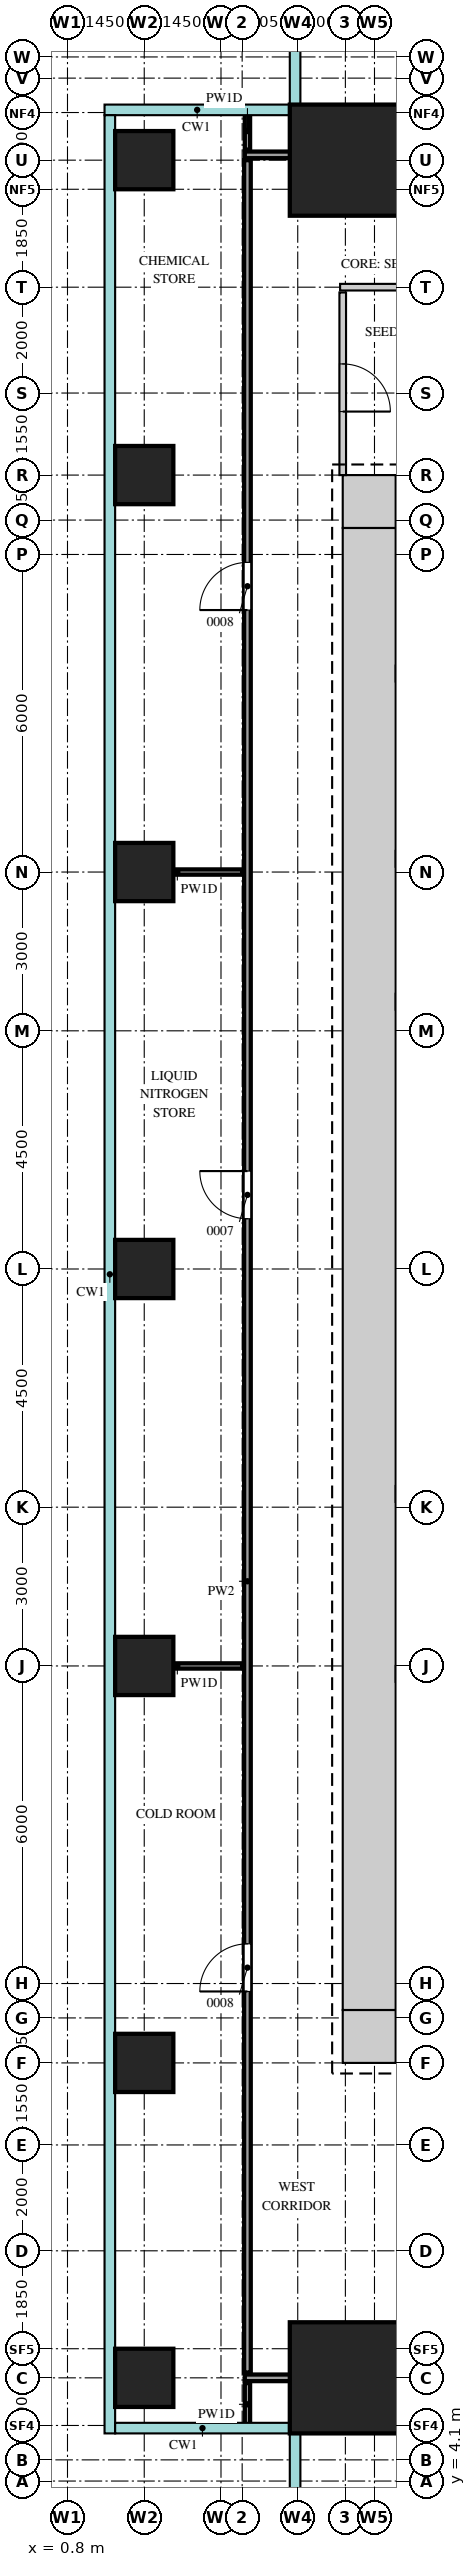
"""IFC4 building model, lengths in metres.
Left out: names, types, materials, properties, quantities, classifications, styles, units other than length and angle.
Written with IfcOpenShell. Run it as: python <this file> out.ifc"""

import sys

from ifc_helpers import new_model, si_unit, direction, frame, frame_2d, origin, origin_2d, place, context, subcontext, project, spatial, rectangle, extrude, source, transform, mapped, element, fill, save


model = new_model("IFC4")
c1 = context("Model", 3, precision=1e-05, world=origin(), true_north=direction((0.0, 1.0)))
c2 = subcontext(c1, "Body", "Model", "MODEL_VIEW")
j1 = project(units=[si_unit("LENGTHUNIT", "METRE"), si_unit("PLANEANGLEUNIT", "RADIAN")], contexts=[c1])
p1 = place(None, origin())
s1 = spatial("IfcSite", under=j1, at=p1, CompositionType="ELEMENT")
p2 = place(p1, origin())
s2 = spatial("IfcBuilding", under=s1, at=p2, CompositionType="ELEMENT")
p3 = place(p2, frame((0.0, 0.0, 105.9)))
s3 = spatial("IfcBuildingStorey", under=s2, at=p3, CompositionType="ELEMENT", Elevation=105.9)
m1 = source(origin(), c2, "Body", "SweptSolid", [
    extrude(rectangle(XDim=1.0, YDim=1.0, at=frame_2d((0.5, 0.0))), origin(), (0.0, 0.0, 1.0), 4.1),
])
for number, where, z_axis, x_axis in (
    (1, (6.0, 41.5, 0.0), (0.0, 0.0, 1.0), (1.0, 0.0, 0.0)),
    (2, (6.0, 12.5, 0.0), (0.0, 0.0, 1.0), (1.0, 0.0, 0.0)),
):
    element("IfcWall", number, at=place(p3, frame(where, z_axis=z_axis, x_axis=x_axis)), inside=s3, PredefinedType="SHEAR", context=c2, shape_type="MappedRepresentation", body=[
        mapped(m1, transform((0.0, 0.0, 0.0))),
    ])
m2 = source(origin(), c2, "Body", "SweptSolid", [
    extrude(rectangle(XDim=28.0, YDim=1.0, at=frame_2d((14.0, 0.0))), origin(), (0.0, 0.0, 1.0), 4.1),
])
p4 = place(p3, frame((6.5, 13.0, 0.0), z_axis=(0.0, 0.0, 1.0), x_axis=(0.0, 1.0, 0.0)))
e3 = element("IfcWall", 3, at=p4, inside=s3, PredefinedType="SHEAR", context=c2, shape_type="MappedRepresentation", body=[
    mapped(m2, transform((0.0, 0.0, 0.0))),
])
m3 = source(origin(), c2, "Body", "SweptSolid", [
    extrude(rectangle(XDim=2.1, YDim=2.1, at=origin_2d()), origin(), (0.0, 0.0, 1.0), 4.4),
])
for number, where, z_axis, x_axis in (
    (4, (6.05, 47.95, 0.0), (0.0, 0.0, 1.0), (1.0, 0.0, 0.0)),
    (5, (6.05, 6.05, 0.0), (0.0, 0.0, 1.0), (1.0, 0.0, 0.0)),
):
    element("IfcColumn", number, at=place(p3, frame(where, z_axis=z_axis, x_axis=x_axis)), inside=s3, PredefinedType="COLUMN", context=c2, shape_type="MappedRepresentation", body=[
        mapped(m3, transform((0.0, 0.0, 0.0))),
    ])
m4 = source(origin(), c2, "Body", "SweptSolid", [
    extrude(rectangle(XDim=1.1, YDim=1.1, at=origin_2d()), origin(), (0.0, 0.0, 1.0), 4.1),
])
for number, where, z_axis, x_axis in (
    (6, (2.25, 6.05, 0.0), (0.0, 0.0, 1.0), (1.0, 0.0, 0.0)),
    (7, (2.25, 12.0, 0.0), (0.0, 0.0, 1.0), (1.0, 0.0, 0.0)),
    (8, (2.25, 19.5, 0.0), (0.0, 0.0, 1.0), (1.0, 0.0, 0.0)),
    (9, (2.25, 27.0, 0.0), (0.0, 0.0, 1.0), (1.0, 0.0, 0.0)),
    (10, (2.25, 34.5, 0.0), (0.0, 0.0, 1.0), (1.0, 0.0, 0.0)),
    (11, (2.25, 42.0, 0.0), (0.0, 0.0, 1.0), (1.0, 0.0, 0.0)),
    (12, (2.25, 47.95, 0.0), (0.0, 0.0, 1.0), (1.0, 0.0, 0.0)),
):
    element("IfcColumn", number, at=place(p3, frame(where, z_axis=z_axis, x_axis=x_axis)), inside=s3, PredefinedType="COLUMN", context=c2, shape_type="MappedRepresentation", body=[
        mapped(m4, transform((0.0, 0.0, 0.0))),
    ])
m5 = source(origin(), c2, "Body", "SweptSolid", [
    extrude(rectangle(XDim=0.8, YDim=0.1, at=frame_2d((0.4, 0.0))), origin(), (0.0, 0.0, 1.0), 4.2),
])
p5 = place(p3, frame((4.2, 5.15, 0.0), z_axis=(0.0, 0.0, 1.0), x_axis=(0.0, 1.0, 0.0)))
e13 = element("IfcWall", 13, at=p5, inside=s3, PredefinedType="PARTITIONING", context=c2, shape_type="MappedRepresentation", body=[
    mapped(m5, transform((0.0, 0.0, 0.0))),
])
m6 = source(origin(), c2, "Body", "SweptSolid", [
    extrude(rectangle(XDim=22.3, YDim=0.125, at=frame_2d((11.15, 0.0))), origin(), (0.0, 0.0, 1.0), 3.55),
])
p6 = place(p3, frame((4.15, 6.05, 0.0), z_axis=(0.0, 0.0, 1.0), x_axis=(1.0, 0.0, 0.0)))
e14 = element("IfcWall", 14, at=p6, inside=s3, PredefinedType="PARTITIONING", context=c2, shape_type="MappedRepresentation", body=[
    mapped(m6, transform((0.0, 0.0, 0.0))),
])
m7 = source(origin(), c2, "Body", "SweptSolid", [
    extrude(rectangle(XDim=0.9, YDim=2.1, at=frame_2d((0.45, 1.05))), frame((0.0, 0.073, 0.0), z_axis=(0.0, -1.0, 0.0), x_axis=(1.0, 0.0, 0.0)), (0.0, 0.0, 1.0), 0.145),
])
p7 = place(p6, frame((3.5, 0.0, 0.0)))
e15 = element("IfcOpeningElement", 15, at=p7, cuts=e14, PredefinedType="OPENING", context=c2, shape_type="MappedRepresentation", body=[
    mapped(m7, transform((0.0, 0.0, 0.0))),
])
p8 = place(p6, frame((11.0, 0.0, 0.0)))
e16 = element("IfcOpeningElement", 16, at=p8, cuts=e14, PredefinedType="OPENING", context=c2, shape_type="MappedRepresentation", body=[
    mapped(m7, transform((0.0, 0.0, 0.0))),
])
p9 = place(p6, frame((18.35, 0.0, 0.0)))
e17 = element("IfcOpeningElement", 17, at=p9, cuts=e14, PredefinedType="OPENING", context=c2, shape_type="MappedRepresentation", body=[
    mapped(m7, transform((0.0, 0.0, 0.0))),
])
m8 = source(origin(), c2, "Body", "SweptSolid", [
    extrude(rectangle(XDim=41.8, YDim=0.125, at=frame_2d((20.9, 0.0))), origin(), (0.0, 0.0, 1.0), 4.2),
])
p10 = place(p3, frame((4.2, 6.15, 0.0), z_axis=(0.0, 0.0, 1.0), x_axis=(0.0, 1.0, 0.0)))
e18 = element("IfcWall", 18, at=p10, inside=s3, PredefinedType="PARTITIONING", context=c2, shape_type="MappedRepresentation", body=[
    mapped(m8, transform((0.0, 0.0, 0.0))),
])
p11 = place(p10, frame((7.2, 0.0, 0.0)))
e19 = element("IfcOpeningElement", 19, at=p11, cuts=e18, PredefinedType="OPENING", context=c2, shape_type="MappedRepresentation", body=[
    mapped(m7, transform((0.0, 0.0, 0.0))),
])
p12 = place(p10, frame((21.8, 0.0, 0.0)))
e20 = element("IfcOpeningElement", 20, at=p12, cuts=e18, PredefinedType="OPENING", context=c2, shape_type="MappedRepresentation", body=[
    mapped(m7, transform((0.0, 0.0, 0.0))),
])
p13 = place(p10, frame((33.3, 0.0, 0.0)))
e21 = element("IfcOpeningElement", 21, at=p13, cuts=e18, PredefinedType="OPENING", context=c2, shape_type="MappedRepresentation", body=[
    mapped(m7, transform((0.0, 0.0, 0.0))),
])
m9 = source(origin(), c2, "Body", "SweptSolid", [
    extrude(rectangle(XDim=2.45, YDim=0.1, at=frame_2d((1.225, 0.0))), origin(), (0.0, 0.0, 1.0), 4.2),
])
for number, where, z_axis, x_axis in (
    (22, (1.65, 19.5, 0.0), (0.0, 0.0, 1.0), (1.0, 0.0, 0.0)),
    (23, (1.65, 34.5, 0.0), (0.0, 0.0, 1.0), (1.0, 0.0, 0.0)),
):
    element("IfcWall", number, at=place(p3, frame(where, z_axis=z_axis, x_axis=x_axis)), inside=s3, PredefinedType="PARTITIONING", context=c2, shape_type="MappedRepresentation", body=[
        mapped(m9, transform((0.0, 0.0, 0.0))),
    ])
m10 = source(origin(), c2, "Body", "SweptSolid", [
    extrude(rectangle(XDim=3.45, YDim=0.125, at=frame_2d((1.725, 0.0))), origin(), (0.0, 0.0, 1.0), 4.2),
])
p14 = place(p3, frame((6.0, 42.0, 0.0), z_axis=(0.0, 0.0, 1.0), x_axis=(0.0, 1.0, 0.0)))
e24 = element("IfcWall", 24, at=p14, inside=s3, PredefinedType="PARTITIONING", context=c2, shape_type="MappedRepresentation", body=[
    mapped(m10, transform((0.0, 0.0, 0.0))),
])
p15 = place(p14, frame((1.2, 0.0, 0.0)))
e25 = element("IfcOpeningElement", 25, at=p15, cuts=e24, PredefinedType="OPENING", context=c2, shape_type="MappedRepresentation", body=[
    mapped(m7, transform((0.0, 0.0, 0.0))),
])
m11 = source(origin(), c2, "Body", "SweptSolid", [
    extrude(rectangle(XDim=7.95, YDim=0.125, at=frame_2d((3.975, 0.0))), origin(), (0.0, 0.0, 1.0), 4.2),
])
p16 = place(p3, frame((5.95, 45.55, 0.0), z_axis=(0.0, 0.0, 1.0), x_axis=(1.0, 0.0, 0.0)))
e26 = element("IfcWall", 26, at=p16, inside=s3, PredefinedType="PARTITIONING", context=c2, shape_type="MappedRepresentation", body=[
    mapped(m11, transform((0.0, 0.0, 0.0))),
])
p17 = place(p16, frame((3.3, 0.0, 0.0)))
e27 = element("IfcOpeningElement", 27, at=p17, cuts=e26, PredefinedType="OPENING", context=c2, shape_type="MappedRepresentation", body=[
    mapped(m7, transform((0.0, 0.0, 0.0))),
])
p18 = place(p16, frame((6.1, 0.0, 0.0)))
e28 = element("IfcOpeningElement", 28, at=p18, cuts=e26, PredefinedType="OPENING", context=c2, shape_type="MappedRepresentation", body=[
    mapped(m7, transform((0.0, 0.0, 0.0))),
])
m12 = source(origin(), c2, "Body", "SweptSolid", [
    extrude(rectangle(XDim=42.2, YDim=0.125, at=frame_2d((21.1, 0.0))), origin(), (0.0, 0.0, 1.0), 3.55),
])
p19 = place(p3, frame((4.15, 48.05, 0.0), z_axis=(0.0, 0.0, 1.0), x_axis=(1.0, 0.0, 0.0)))
e29 = element("IfcWall", 29, at=p19, inside=s3, PredefinedType="PARTITIONING", context=c2, shape_type="MappedRepresentation", body=[
    mapped(m12, transform((0.0, 0.0, 0.0))),
])
p20 = place(p19, frame((7.25, 0.0, 0.0)))
e30 = element("IfcOpeningElement", 30, at=p20, cuts=e29, PredefinedType="OPENING", context=c2, shape_type="MappedRepresentation", body=[
    mapped(m7, transform((0.0, 0.0, 0.0))),
])
m13 = source(origin(), c2, "Body", "SweptSolid", [
    extrude(rectangle(XDim=1.2, YDim=2.1, at=frame_2d((0.6, 1.05))), frame((0.0, 0.073, 0.0), z_axis=(0.0, -1.0, 0.0), x_axis=(1.0, 0.0, 0.0)), (0.0, 0.0, 1.0), 0.145),
])
p21 = place(p19, frame((28.35, 0.0, 0.0)))
e31 = element("IfcOpeningElement", 31, at=p21, cuts=e29, PredefinedType="OPENING", context=c2, shape_type="MappedRepresentation", body=[
    mapped(m13, transform((0.0, 0.0, 0.0))),
])
m14 = source(origin(), c2, "Body", "SweptSolid", [
    extrude(rectangle(XDim=0.7, YDim=0.1, at=frame_2d((0.35, 0.0))), origin(), (0.0, 0.0, 1.0), 4.2),
])
p22 = place(p3, frame((4.2, 48.15, 0.0), z_axis=(0.0, 0.0, 1.0), x_axis=(0.0, 1.0, 0.0)))
e32 = element("IfcWall", 32, at=p22, inside=s3, PredefinedType="PARTITIONING", context=c2, shape_type="MappedRepresentation", body=[
    mapped(m14, transform((0.0, 0.0, 0.0))),
])
m15 = source(origin(), c2, "Body", "SweptSolid", [
    extrude(rectangle(XDim=0.9, YDim=2.1, at=frame_2d((0.45, 1.05))), frame((0.0, 0.025, 0.0), z_axis=(0.0, -1.0, 0.0), x_axis=(1.0, 0.0, 0.0)), (0.0, 0.0, 1.0), 0.05),
])
p23 = place(p11, origin())
e33 = element("IfcDoor", 33, at=p23, inside=s3, OperationType="SINGLE_SWING_RIGHT", PredefinedType="DOOR", context=c2, shape_type="MappedRepresentation", body=[
    mapped(m15, transform((0.0, 0.0, 0.0))),
])
fill(e19, e33)
p24 = place(p12, origin())
e34 = element("IfcDoor", 34, at=p24, inside=s3, OperationType="SINGLE_SWING_LEFT", PredefinedType="DOOR", context=c2, shape_type="MappedRepresentation", body=[
    mapped(m15, transform((0.0, 0.0, 0.0))),
])
fill(e20, e34)
p25 = place(p13, origin())
e35 = element("IfcDoor", 35, at=p25, inside=s3, OperationType="SINGLE_SWING_RIGHT", PredefinedType="DOOR", context=c2, shape_type="MappedRepresentation", body=[
    mapped(m15, transform((0.0, 0.0, 0.0))),
])
fill(e21, e35)
p26 = place(p15, origin())
e36 = element("IfcDoor", 36, at=p26, inside=s3, OperationType="SINGLE_SWING_LEFT", PredefinedType="DOOR", context=c2, shape_type="MappedRepresentation", body=[
    mapped(m15, transform((0.0, 0.0, 0.0))),
])
fill(e25, e36)
save(model, sys.argv[1])
